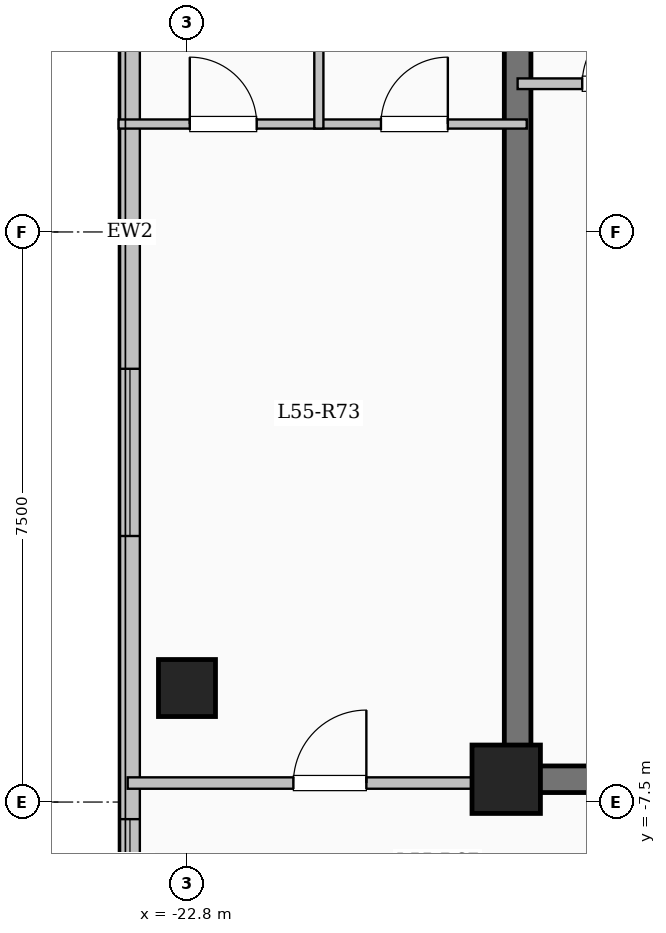
"""IFC4 building model, lengths in metres.
Left out: names, types, materials, properties, quantities, classifications, styles, units other than length and angle.
Written with IfcOpenShell. Run it as: python <this file> out.ifc"""

import sys

from ifc_helpers import new_model, si_unit, direction, frame, frame_2d, origin, origin_2d, place, context, subcontext, project, spatial, rectangle, extrude, element, fill, save


model = new_model("IFC4")
c1 = context("Model", 3, precision=1e-05, world=origin(), true_north=direction((0.0, 1.0)))
c2 = subcontext(c1, "Body", "Model", "MODEL_VIEW")
j1 = project(units=[si_unit("LENGTHUNIT", "METRE"), si_unit("PLANEANGLEUNIT", "RADIAN")], contexts=[c1])
p1 = place(None, origin())
s1 = spatial("IfcSite", under=j1, at=p1, CompositionType="ELEMENT")
p2 = place(p1, origin())
s2 = spatial("IfcBuilding", under=s1, at=p2, CompositionType="ELEMENT")
p3 = place(p2, frame((0.0, 0.0, 203.65)))
s3 = spatial("IfcBuildingStorey", under=s2, at=p3, CompositionType="ELEMENT", Elevation=203.65)
p4 = place(p3, frame((-18.6, -7.2, 0.0), z_axis=(0.0, 0.0, 1.0), x_axis=(1.0, 0.0, 0.0)))
e1 = element("IfcColumn", 1, at=p4, inside=s3, PredefinedType="COLUMN", context=c2, shape_type="SweptSolid", body=[
    extrude(rectangle(XDim=0.9, YDim=0.9, at=origin_2d()), origin(), (0.0, 0.0, 1.0), 3.35),
])
p5 = place(p3, frame((-22.8, -6.0, 0.0), z_axis=(0.0, 0.0, 1.0), x_axis=(1.0, 0.0, 0.0)))
e2 = element("IfcColumn", 2, at=p5, inside=s3, PredefinedType="COLUMN", context=c2, shape_type="SweptSolid", body=[
    extrude(rectangle(XDim=0.75, YDim=0.75, at=origin_2d()), origin(), (0.0, 0.0, 1.0), 3.35),
])
p6 = place(p3, frame((-23.55, -17.25, 0.0), z_axis=(0.0, 0.0, 1.0), x_axis=(0.0, 1.0, 0.0)))
e3 = element("IfcWall", 3, at=p6, inside=s3, PredefinedType="SOLIDWALL", context=c2, shape_type="SweptSolid", body=[
    extrude(rectangle(XDim=34.5, YDim=0.26, at=frame_2d((17.25, 0.0))), origin(), (0.0, 0.0, 1.0), 3.1),
])
p7 = place(p6, frame((2.825, 0.0, 0.9)))
e4 = element("IfcOpeningElement", 4, at=p7, cuts=e3, PredefinedType="OPENING", context=c2, shape_type="SweptSolid", body=[
    extrude(rectangle(XDim=2.2, YDim=1.75, at=frame_2d((1.1, 0.875))), frame((0.0, 0.14, 0.0), z_axis=(0.0, -1.0, 0.0), x_axis=(1.0, 0.0, 0.0)), (0.0, 0.0, 1.0), 0.28),
])
p8 = place(p6, frame((8.325, 0.0, 0.95)))
e5 = element("IfcOpeningElement", 5, at=p8, cuts=e3, PredefinedType="OPENING", context=c2, shape_type="SweptSolid", body=[
    extrude(rectangle(XDim=1.2, YDim=1.5, at=frame_2d((0.6, 0.75))), frame((0.0, 0.14, 0.0), z_axis=(0.0, -1.0, 0.0), x_axis=(1.0, 0.0, 0.0)), (0.0, 0.0, 1.0), 0.28),
])
p9 = place(p6, frame((13.25, 0.0, 0.9)))
e6 = element("IfcOpeningElement", 6, at=p9, cuts=e3, PredefinedType="OPENING", context=c2, shape_type="SweptSolid", body=[
    extrude(rectangle(XDim=2.2, YDim=1.75, at=frame_2d((1.1, 0.875))), frame((0.0, 0.14, 0.0), z_axis=(0.0, -1.0, 0.0), x_axis=(1.0, 0.0, 0.0)), (0.0, 0.0, 1.0), 0.28),
])
p10 = place(p6, frame((19.65, 0.0, 0.9)))
e7 = element("IfcOpeningElement", 7, at=p10, cuts=e3, PredefinedType="OPENING", context=c2, shape_type="SweptSolid", body=[
    extrude(rectangle(XDim=1.65, YDim=1.6, at=frame_2d((0.825, 0.8))), frame((0.0, 0.14, 0.0), z_axis=(0.0, -1.0, 0.0), x_axis=(1.0, 0.0, 0.0)), (0.0, 0.0, 1.0), 0.28),
])
p11 = place(p6, frame((24.125, 0.0, 0.9)))
e8 = element("IfcOpeningElement", 8, at=p11, cuts=e3, PredefinedType="OPENING", context=c2, shape_type="SweptSolid", body=[
    extrude(rectangle(XDim=2.0, YDim=1.7, at=frame_2d((1.0, 0.85))), frame((0.0, 0.14, 0.0), z_axis=(0.0, -1.0, 0.0), x_axis=(1.0, 0.0, 0.0)), (0.0, 0.0, 1.0), 0.28),
])
p12 = place(p6, frame((28.375, 0.0, 0.95)))
e9 = element("IfcOpeningElement", 9, at=p12, cuts=e3, PredefinedType="OPENING", context=c2, shape_type="SweptSolid", body=[
    extrude(rectangle(XDim=1.0, YDim=1.5, at=frame_2d((0.5, 0.75))), frame((0.0, 0.14, 0.0), z_axis=(0.0, -1.0, 0.0), x_axis=(1.0, 0.0, 0.0)), (0.0, 0.0, 1.0), 0.28),
])
p13 = place(p6, frame((31.125, 0.0, 0.9)))
e10 = element("IfcOpeningElement", 10, at=p13, cuts=e3, PredefinedType="OPENING", context=c2, shape_type="SweptSolid", body=[
    extrude(rectangle(XDim=2.0, YDim=1.7, at=frame_2d((1.0, 0.85))), frame((0.0, 0.14, 0.0), z_axis=(0.0, -1.0, 0.0), x_axis=(1.0, 0.0, 0.0)), (0.0, 0.0, 1.0), 0.28),
])
p14 = place(p3, frame((-18.45, -7.375, 0.0), z_axis=(0.0, 0.0, 1.0), x_axis=(0.0, 1.0, 0.0)))
e11 = element("IfcWall", 11, at=p14, inside=s3, PredefinedType="SHEAR", context=c2, shape_type="SweptSolid", body=[
    extrude(rectangle(XDim=14.05, YDim=0.35, at=frame_2d((7.025, 0.0))), origin(), (0.0, 0.0, 1.0), 3.35),
])
p15 = place(p3, frame((-18.625, -7.2, 0.0), z_axis=(0.0, 0.0, 1.0), x_axis=(1.0, 0.0, 0.0)))
e12 = element("IfcWall", 12, at=p15, inside=s3, PredefinedType="SHEAR", context=c2, shape_type="SweptSolid", body=[
    extrude(rectangle(XDim=6.0, YDim=0.35, at=frame_2d((3.0, 0.0))), origin(), (0.0, 0.0, 1.0), 3.35),
])
p16 = place(p15, frame((1.725, 0.0, 0.0)))
e13 = element("IfcOpeningElement", 13, at=p16, cuts=e12, PredefinedType="OPENING", context=c2, shape_type="SweptSolid", body=[
    extrude(rectangle(XDim=1.12, YDim=2.15, at=frame_2d((0.56, 1.075))), frame((0.0, 0.185, 0.0), z_axis=(0.0, -1.0, 0.0), x_axis=(1.0, 0.0, 0.0)), (0.0, 0.0, 1.0), 0.37),
])
p17 = place(p3, frame((-18.45, 1.95, 0.0), z_axis=(0.0, 0.0, 1.0), x_axis=(1.0, 0.0, 0.0)))
e14 = element("IfcWall", 14, at=p17, inside=s3, PredefinedType="PARTITIONING", context=c2, shape_type="SweptSolid", body=[
    extrude(rectangle(XDim=3.15, YDim=0.14, at=frame_2d((1.575, 0.0))), origin(), (0.0, 0.0, 1.0), 3.1),
])
p18 = place(p17, frame((0.85, 0.0, 0.0)))
e15 = element("IfcOpeningElement", 15, at=p18, cuts=e14, PredefinedType="OPENING", context=c2, shape_type="SweptSolid", body=[
    extrude(rectangle(XDim=0.9, YDim=2.08, at=frame_2d((0.45, 1.04))), frame((0.0, 0.08, 0.0), z_axis=(0.0, -1.0, 0.0), x_axis=(1.0, 0.0, 0.0)), (0.0, 0.0, 1.0), 0.16),
])
p19 = place(p3, frame((-23.58, -7.25, 0.0), z_axis=(0.0, 0.0, 1.0), x_axis=(1.0, 0.0, 0.0)))
e16 = element("IfcWall", 16, at=p19, inside=s3, PredefinedType="PARTITIONING", context=c2, shape_type="SweptSolid", body=[
    extrude(rectangle(XDim=5.13, YDim=0.15, at=frame_2d((2.565, 0.0))), origin(), (0.0, 0.0, 1.0), 3.1),
])
p20 = place(p19, frame((2.18, 0.0, 0.0)))
e17 = element("IfcOpeningElement", 17, at=p20, cuts=e16, PredefinedType="OPENING", context=c2, shape_type="SweptSolid", body=[
    extrude(rectangle(XDim=0.96, YDim=2.15, at=frame_2d((0.48, 1.075))), frame((0.0, 0.085, 0.0), z_axis=(0.0, -1.0, 0.0), x_axis=(1.0, 0.0, 0.0)), (0.0, 0.0, 1.0), 0.17),
])
p21 = place(p3, frame((-23.7, 1.42, 0.0), z_axis=(0.0, 0.0, 1.0), x_axis=(1.0, 0.0, 0.0)))
e18 = element("IfcWall", 18, at=p21, inside=s3, PredefinedType="PARTITIONING", context=c2, shape_type="SweptSolid", body=[
    extrude(rectangle(XDim=5.37, YDim=0.12, at=frame_2d((2.685, 0.0))), origin(), (0.0, 0.0, 1.0), 3.1),
])
p22 = place(p21, frame((0.937, 0.0, 0.0)))
e19 = element("IfcOpeningElement", 19, at=p22, cuts=e18, PredefinedType="OPENING", context=c2, shape_type="SweptSolid", body=[
    extrude(rectangle(XDim=0.88, YDim=2.1, at=frame_2d((0.44, 1.05))), frame((0.0, 0.07, 0.0), z_axis=(0.0, -1.0, 0.0), x_axis=(1.0, 0.0, 0.0)), (0.0, 0.0, 1.0), 0.14),
])
p23 = place(p21, frame((3.452, 0.0, 0.0)))
e20 = element("IfcOpeningElement", 20, at=p23, cuts=e18, PredefinedType="OPENING", context=c2, shape_type="SweptSolid", body=[
    extrude(rectangle(XDim=0.88, YDim=2.1, at=frame_2d((0.44, 1.05))), frame((0.0, 0.07, 0.0), z_axis=(0.0, -1.0, 0.0), x_axis=(1.0, 0.0, 0.0)), (0.0, 0.0, 1.0), 0.14),
])
p24 = place(p3, frame((-21.065, 1.36, 0.0), z_axis=(0.0, 0.0, 1.0), x_axis=(0.0, 1.0, 0.0)))
e21 = element("IfcWall", 21, at=p24, inside=s3, PredefinedType="PARTITIONING", context=c2, shape_type="SweptSolid", body=[
    extrude(rectangle(XDim=3.58, YDim=0.12, at=frame_2d((1.79, 0.0))), origin(), (0.0, 0.0, 1.0), 3.1),
])
p25 = place(p8, origin())
e22 = element("IfcWindow", 22, at=p25, inside=s3, PartitioningType="SINGLE_PANEL", PredefinedType="WINDOW", context=c2, shape_type="SweptSolid", body=[
    extrude(rectangle(XDim=1.2, YDim=1.5, at=frame_2d((0.6, 0.75))), frame((0.0, 0.03, 0.0), z_axis=(0.0, -1.0, 0.0), x_axis=(1.0, 0.0, 0.0)), (0.0, 0.0, 1.0), 0.06),
])
fill(e5, e22)
p26 = place(p9, origin())
e23 = element("IfcWindow", 23, at=p26, inside=s3, PartitioningType="SINGLE_PANEL", PredefinedType="WINDOW", context=c2, shape_type="SweptSolid", body=[
    extrude(rectangle(XDim=2.2, YDim=1.75, at=frame_2d((1.1, 0.875))), frame((0.0, 0.03, 0.0), z_axis=(0.0, -1.0, 0.0), x_axis=(1.0, 0.0, 0.0)), (0.0, 0.0, 1.0), 0.06),
])
fill(e6, e23)
p27 = place(p18, origin())
e24 = element("IfcDoor", 24, at=p27, inside=s3, OperationType="SINGLE_SWING_RIGHT", PredefinedType="DOOR", context=c2, shape_type="SweptSolid", body=[
    extrude(rectangle(XDim=0.9, YDim=2.08, at=frame_2d((0.45, 1.04))), frame((0.0, 0.025, 0.0), z_axis=(0.0, -1.0, 0.0), x_axis=(1.0, 0.0, 0.0)), (0.0, 0.0, 1.0), 0.05),
])
fill(e15, e24)
p28 = place(p20, origin())
e25 = element("IfcDoor", 25, at=p28, inside=s3, OperationType="SINGLE_SWING_RIGHT", PredefinedType="DOOR", context=c2, shape_type="SweptSolid", body=[
    extrude(rectangle(XDim=0.96, YDim=2.15, at=frame_2d((0.48, 1.075))), frame((0.0, 0.025, 0.0), z_axis=(0.0, -1.0, 0.0), x_axis=(1.0, 0.0, 0.0)), (0.0, 0.0, 1.0), 0.05),
])
fill(e17, e25)
p29 = place(p22, origin())
e26 = element("IfcDoor", 26, at=p29, inside=s3, OperationType="SINGLE_SWING_LEFT", PredefinedType="DOOR", context=c2, shape_type="SweptSolid", body=[
    extrude(rectangle(XDim=0.88, YDim=2.1, at=frame_2d((0.44, 1.05))), frame((0.0, 0.025, 0.0), z_axis=(0.0, -1.0, 0.0), x_axis=(1.0, 0.0, 0.0)), (0.0, 0.0, 1.0), 0.05),
])
fill(e19, e26)
p30 = place(p23, origin())
e27 = element("IfcDoor", 27, at=p30, inside=s3, OperationType="SINGLE_SWING_RIGHT", PredefinedType="DOOR", context=c2, shape_type="SweptSolid", body=[
    extrude(rectangle(XDim=0.88, YDim=2.1, at=frame_2d((0.44, 1.05))), frame((0.0, 0.025, 0.0), z_axis=(0.0, -1.0, 0.0), x_axis=(1.0, 0.0, 0.0)), (0.0, 0.0, 1.0), 0.05),
])
fill(e20, e27)
save(model, sys.argv[1])
